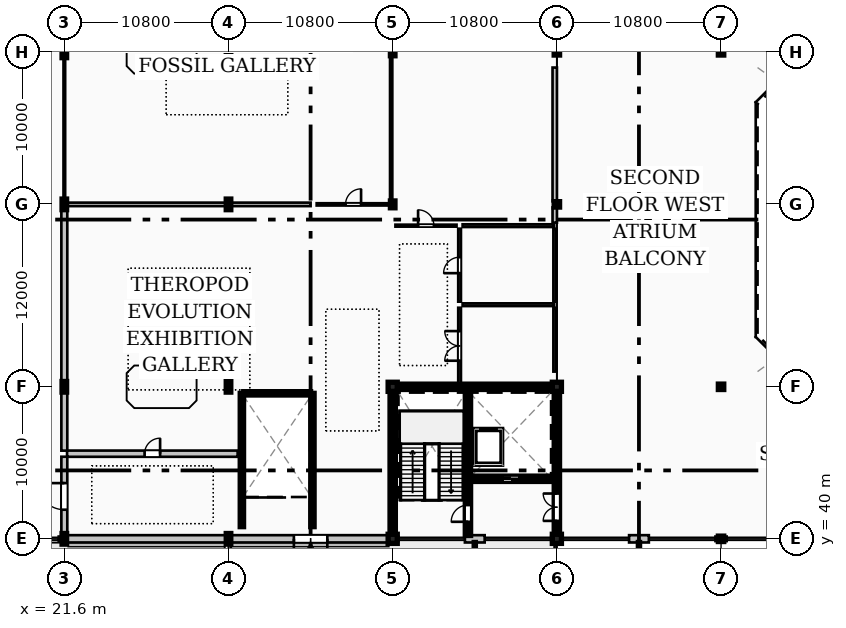
"""IFC4 building model, lengths in metres.
Left out: names, types, materials, properties, quantities, classifications, styles, units other than length and angle.
Written with IfcOpenShell. Run it as: python <this file> out.ifc"""

import sys

from ifc_helpers import new_model, si_unit, direction, frame, frame_2d, origin, origin_2d, place, context, subcontext, project, spatial, rectangle, hollow_circle, i_section, extrude, element, fill, save


model = new_model("IFC4")
c1 = context("Model", 3, precision=1e-05, world=origin(), true_north=direction((0.0, 1.0)))
c2 = subcontext(c1, "Body", "Model", "MODEL_VIEW")
j1 = project(units=[si_unit("LENGTHUNIT", "METRE"), si_unit("PLANEANGLEUNIT", "RADIAN")], contexts=[c1])
p1 = place(None, origin())
s1 = spatial("IfcSite", under=j1, at=p1, CompositionType="ELEMENT")
p2 = place(p1, origin())
s2 = spatial("IfcBuilding", under=s1, at=p2, CompositionType="ELEMENT")
p3 = place(p2, frame((0.0, 0.0, 9.6)))
s3 = spatial("IfcBuildingStorey", under=s2, at=p3, CompositionType="ELEMENT", Elevation=9.6)
for number, where, z_axis, x_axis in (
    (1, (21.6, 40.0, 0.0), (0.0, 0.0, 1.0), (1.0, 0.0, 0.0)),
    (2, (21.6, 50.0, 0.0), (0.0, 0.0, 1.0), (1.0, 0.0, 0.0)),
    (3, (21.6, 62.0, 0.0), (0.0, 0.0, 1.0), (1.0, 0.0, 0.0)),
    (4, (21.6, 72.0, 0.0), (0.0, 0.0, 1.0), (1.0, 0.0, 0.0)),
    (5, (32.4, 40.0, 0.0), (0.0, 0.0, 1.0), (1.0, 0.0, 0.0)),
    (6, (32.4, 50.0, 0.0), (0.0, 0.0, 1.0), (1.0, 0.0, 0.0)),
    (7, (32.4, 62.0, 0.0), (0.0, 0.0, 1.0), (1.0, 0.0, 0.0)),
    (8, (32.4, 72.0, 0.0), (0.0, 0.0, 1.0), (1.0, 0.0, 0.0)),
):
    element("IfcColumn", number, at=place(p3, frame(where, z_axis=z_axis, x_axis=x_axis)), inside=s3, PredefinedType="COLUMN", context=c2, shape_type="SweptSolid", body=[
        extrude(i_section(OverallWidth=0.3, OverallDepth=0.7, WebThickness=0.017, FlangeThickness=0.032, FilletRadius=0.027, at=origin_2d()), origin(), (0.0, 0.0, 1.0), 4.8),
    ])
for number, where, z_axis, x_axis in (
    (9, (43.2, 40.0, 0.0), (0.0, 0.0, 1.0), (1.0, 0.0, 0.0)),
    (10, (43.2, 50.0, 0.0), (0.0, 0.0, 1.0), (1.0, 0.0, 0.0)),
):
    element("IfcColumn", number, at=place(p3, frame(where, z_axis=z_axis, x_axis=x_axis)), inside=s3, PredefinedType="COLUMN", context=c2, shape_type="SweptSolid", body=[
        extrude(rectangle(XDim=0.6, YDim=0.6, at=origin_2d()), origin(), (0.0, 0.0, 1.0), 4.8),
    ])
for number, where, z_axis, x_axis in (
    (11, (43.2, 62.0, 0.0), (0.0, 0.0, 1.0), (1.0, 0.0, 0.0)),
    (12, (43.2, 72.0, 0.0), (0.0, 0.0, 1.0), (1.0, 0.0, 0.0)),
):
    element("IfcColumn", number, at=place(p3, frame(where, z_axis=z_axis, x_axis=x_axis)), inside=s3, PredefinedType="COLUMN", context=c2, shape_type="SweptSolid", body=[
        extrude(i_section(OverallWidth=0.3, OverallDepth=0.45, WebThickness=0.014, FlangeThickness=0.026, FilletRadius=0.027, at=origin_2d()), origin(), (0.0, 0.0, 1.0), 4.8),
    ])
for number, where, z_axis, x_axis in (
    (13, (54.0, 40.0, 0.0), (0.0, 0.0, 1.0), (1.0, 0.0, 0.0)),
    (14, (54.0, 50.0, 0.0), (0.0, 0.0, 1.0), (1.0, 0.0, 0.0)),
):
    element("IfcColumn", number, at=place(p3, frame(where, z_axis=z_axis, x_axis=x_axis)), inside=s3, PredefinedType="COLUMN", context=c2, shape_type="SweptSolid", body=[
        extrude(rectangle(XDim=0.6, YDim=0.6, at=origin_2d()), origin(), (0.0, 0.0, 1.0), 4.8),
    ])
for number, where, z_axis, x_axis in (
    (15, (54.0, 62.0, 0.0), (0.0, 0.0, 1.0), (1.0, 0.0, 0.0)),
    (16, (54.0, 72.0, 0.0), (0.0, 0.0, 1.0), (1.0, 0.0, 0.0)),
    (17, (64.8, 40.0, 0.0), (0.0, 0.0, 1.0), (1.0, 0.0, 0.0)),
    (18, (64.8, 50.0, 0.0), (0.0, 0.0, 1.0), (1.0, 0.0, 0.0)),
    (19, (64.8, 62.0, 0.0), (0.0, 0.0, 1.0), (1.0, 0.0, 0.0)),
    (20, (64.8, 72.0, 0.0), (0.0, 0.0, 1.0), (1.0, 0.0, 0.0)),
):
    element("IfcColumn", number, at=place(p3, frame(where, z_axis=z_axis, x_axis=x_axis)), inside=s3, PredefinedType="COLUMN", context=c2, shape_type="SweptSolid", body=[
        extrude(hollow_circle(Radius=0.178, WallThickness=0.016, at=origin_2d()), origin(), (0.0, 0.0, 1.0), 4.8),
    ])
p4 = place(p3, frame((21.23, 40.0, 0.0), z_axis=(0.0, 0.0, 1.0), x_axis=(1.0, 0.0, 0.0)))
e21 = element("IfcWall", 21, at=p4, inside=s3, PredefinedType="STANDARD", context=c2, shape_type="SweptSolid", body=[
    extrude(rectangle(XDim=0.225, YDim=0.3, at=frame_2d((0.113, 0.0))), origin(), (0.0, 0.0, 1.0), 4.56),
])
p5 = place(p3, frame((21.745, 40.0, 0.0), z_axis=(0.0, 0.0, 1.0), x_axis=(1.0, 0.0, 0.0)))
e22 = element("IfcWall", 22, at=p5, inside=s3, PredefinedType="STANDARD", context=c2, shape_type="SweptSolid", body=[
    extrude(rectangle(XDim=10.51, YDim=0.48, at=frame_2d((5.255, 0.0))), origin(), (0.0, 0.0, 1.0), 3.94),
])
p6 = place(p3, frame((32.545, 40.0, 0.0), z_axis=(0.0, 0.0, 1.0), x_axis=(1.0, 0.0, 0.0)))
e23 = element("IfcWall", 23, at=p6, inside=s3, PredefinedType="STANDARD", context=c2, shape_type="SweptSolid", body=[
    extrude(rectangle(XDim=10.51, YDim=0.48, at=frame_2d((5.255, 0.0))), origin(), (0.0, 0.0, 1.0), 4.09),
])
p7 = place(p6, frame((4.155, 0.0, 0.0)))
e24 = element("IfcOpeningElement", 24, at=p7, cuts=e23, PredefinedType="OPENING", context=c2, shape_type="SweptSolid", body=[
    extrude(rectangle(XDim=2.2, YDim=2.4, at=frame_2d((1.1, 1.2))), frame((0.0, 0.25, 0.0), z_axis=(0.0, -1.0, 0.0), x_axis=(1.0, 0.0, 0.0)), (0.0, 0.0, 1.0), 0.5),
])
p8 = place(p3, frame((47.95, 40.0, 0.0), z_axis=(0.0, 0.0, 1.0), x_axis=(1.0, 0.0, 0.0)))
e25 = element("IfcWall", 25, at=p8, inside=s3, PredefinedType="STANDARD", context=c2, shape_type="SweptSolid", body=[
    extrude(rectangle(XDim=1.3, YDim=0.48, at=frame_2d((0.65, 0.0))), origin(), (0.0, 0.0, 1.0), 4.09),
])
for number, where, z_axis, x_axis in (
    (26, (43.345, 40.0, 0.0), (0.0, 0.0, 1.0), (1.0, 0.0, 0.0)),
    (27, (53.63, 40.0, 0.0), (0.0, 0.0, 1.0), (1.0, 0.0, 0.0)),
):
    element("IfcWall", number, at=place(p3, frame(where, z_axis=z_axis, x_axis=x_axis)), inside=s3, PredefinedType="STANDARD", context=c2, shape_type="SweptSolid", body=[
        extrude(rectangle(XDim=0.225, YDim=0.3, at=frame_2d((0.113, 0.0))), origin(), (0.0, 0.0, 1.0), 4.56),
    ])
p9 = place(p3, frame((58.75, 40.0, 0.0), z_axis=(0.0, 0.0, 1.0), x_axis=(1.0, 0.0, 0.0)))
e28 = element("IfcWall", 28, at=p9, inside=s3, PredefinedType="STANDARD", context=c2, shape_type="SweptSolid", body=[
    extrude(rectangle(XDim=1.3, YDim=0.48, at=frame_2d((0.65, 0.0))), origin(), (0.0, 0.0, 1.0), 4.11),
])
for number, where, z_axis, x_axis in (
    (29, (54.145, 40.0, 0.0), (0.0, 0.0, 1.0), (1.0, 0.0, 0.0)),
    (30, (64.43, 40.0, 0.0), (0.0, 0.0, 1.0), (1.0, 0.0, 0.0)),
):
    element("IfcWall", number, at=place(p3, frame(where, z_axis=z_axis, x_axis=x_axis)), inside=s3, PredefinedType="STANDARD", context=c2, shape_type="SweptSolid", body=[
        extrude(rectangle(XDim=0.225, YDim=0.3, at=frame_2d((0.113, 0.0))), origin(), (0.0, 0.0, 1.0), 4.56),
    ])
p10 = place(p3, frame((64.945, 40.0, 0.0), z_axis=(0.0, 0.0, 1.0), x_axis=(1.0, 0.0, 0.0)))
e31 = element("IfcWall", 31, at=p10, inside=s3, PredefinedType="STANDARD", context=c2, shape_type="SweptSolid", body=[
    extrude(rectangle(XDim=0.225, YDim=0.3, at=frame_2d((0.112, 0.0))), origin(), (0.0, 0.0, 1.0), 4.56),
])
p11 = place(p3, frame((43.5, 50.0, 0.0), z_axis=(0.0, 0.0, 1.0), x_axis=(1.0, 0.0, 0.0)))
e32 = element("IfcWall", 32, at=p11, inside=s3, PredefinedType="SHEAR", context=c2, shape_type="SweptSolid", body=[
    extrude(rectangle(XDim=10.2, YDim=0.35, at=frame_2d((5.1, 0.0))), origin(), (0.0, 0.0, 1.0), 4.56),
])
p12 = place(p3, frame((43.2, 40.3, 0.0), z_axis=(0.0, 0.0, 1.0), x_axis=(0.0, 1.0, 0.0)))
e33 = element("IfcWall", 33, at=p12, inside=s3, PredefinedType="SHEAR", context=c2, shape_type="SweptSolid", body=[
    extrude(rectangle(XDim=9.4, YDim=0.35, at=frame_2d((4.7, 0.0))), origin(), (0.0, 0.0, 1.0), 4.56),
])
p13 = place(p3, frame((54.0, 40.3, 0.0), z_axis=(0.0, 0.0, 1.0), x_axis=(0.0, 1.0, 0.0)))
e34 = element("IfcWall", 34, at=p13, inside=s3, PredefinedType="SHEAR", context=c2, shape_type="SweptSolid", body=[
    extrude(rectangle(XDim=9.4, YDim=0.35, at=frame_2d((4.7, 0.0))), origin(), (0.0, 0.0, 1.0), 4.56),
])
p14 = place(p13, frame((0.88, 0.0, 0.0)))
e35 = element("IfcOpeningElement", 35, at=p14, cuts=e34, PredefinedType="OPENING", context=c2, shape_type="SweptSolid", body=[
    extrude(rectangle(XDim=1.8, YDim=2.25, at=frame_2d((0.9, 1.125))), frame((0.0, 0.185, 0.0), z_axis=(0.0, -1.0, 0.0), x_axis=(1.0, 0.0, 0.0)), (0.0, 0.0, 1.0), 0.37),
])
p15 = place(p3, frame((48.15, 40.22, 0.0), z_axis=(0.0, 0.0, 1.0), x_axis=(0.0, 1.0, 0.0)))
e36 = element("IfcWall", 36, at=p15, inside=s3, PredefinedType="SHEAR", context=c2, shape_type="SweptSolid", body=[
    extrude(rectangle(XDim=9.605, YDim=0.35, at=frame_2d((4.802, 0.0))), origin(), (0.0, 0.0, 1.0), 4.56),
])
p16 = place(p15, frame((0.9, 0.0, 0.0)))
e37 = element("IfcOpeningElement", 37, at=p16, cuts=e36, PredefinedType="OPENING", context=c2, shape_type="SweptSolid", body=[
    extrude(rectangle(XDim=1.1, YDim=2.2, at=frame_2d((0.55, 1.1))), frame((0.0, 0.185, 0.0), z_axis=(0.0, -1.0, 0.0), x_axis=(1.0, 0.0, 0.0)), (0.0, 0.0, 1.0), 0.37),
])
p17 = place(p3, frame((48.33, 43.95, 0.0), z_axis=(0.0, 0.0, 1.0), x_axis=(1.0, 0.0, 0.0)))
e38 = element("IfcWall", 38, at=p17, inside=s3, PredefinedType="SHEAR", context=c2, shape_type="SweptSolid", body=[
    extrude(rectangle(XDim=5.49, YDim=0.35, at=frame_2d((2.745, 0.0))), origin(), (0.0, 0.0, 1.0), 4.56),
])
p18 = place(p17, frame((2.1, 0.0, 0.0)))
e39 = element("IfcOpeningElement", 39, at=p18, cuts=e38, PredefinedType="OPENING", context=c2, shape_type="SweptSolid", body=[
    extrude(rectangle(XDim=1.1, YDim=2.2, at=frame_2d((0.55, 1.1))), frame((0.0, 0.185, 0.0), z_axis=(0.0, -1.0, 0.0), x_axis=(1.0, 0.0, 0.0)), (0.0, 0.0, 1.0), 0.37),
])
for number, where, z_axis, x_axis in (
    (40, (33.28, 40.8, 0.0), (0.0, 0.0, 1.0), (0.0, 1.0, 0.0)),
    (41, (37.92, 40.8, 0.0), (0.0, 0.0, 1.0), (0.0, 1.0, 0.0)),
):
    element("IfcWall", number, at=place(p3, frame(where, z_axis=z_axis, x_axis=x_axis)), inside=s3, PredefinedType="SHEAR", context=c2, shape_type="SweptSolid", body=[
        extrude(rectangle(XDim=8.77, YDim=0.22, at=frame_2d((4.385, 0.0))), origin(), (0.0, 0.0, 1.0), 4.56),
    ])
p19 = place(p3, frame((33.4, 49.57, 0.0), z_axis=(0.0, 0.0, 1.0), x_axis=(1.0, 0.0, 0.0)))
e42 = element("IfcWall", 42, at=p19, inside=s3, PredefinedType="SHEAR", context=c2, shape_type="SweptSolid", body=[
    extrude(rectangle(XDim=4.4, YDim=0.22, at=frame_2d((2.2, 0.0))), origin(), (0.0, 0.0, 1.0), 4.56),
])
p20 = place(p3, frame((21.78, 45.6, 0.0), z_axis=(0.0, 0.0, 1.0), x_axis=(1.0, 0.0, 0.0)))
e43 = element("IfcWall", 43, at=p20, inside=s3, PredefinedType="PARTITIONING", context=c2, shape_type="SweptSolid", body=[
    extrude(rectangle(XDim=11.22, YDim=0.41, at=frame_2d((5.61, 0.0))), origin(), (0.0, 0.0, 1.0), 4.52),
])
p21 = place(p20, frame((5.1, 0.0, 0.0)))
e44 = element("IfcOpeningElement", 44, at=p21, cuts=e43, PredefinedType="OPENING", context=c2, shape_type="SweptSolid", body=[
    extrude(rectangle(XDim=1.02, YDim=2.1, at=frame_2d((0.51, 1.05))), frame((0.0, 0.215, 0.0), z_axis=(0.0, -1.0, 0.0), x_axis=(1.0, 0.0, 0.0)), (0.0, 0.0, 1.0), 0.43),
])
p22 = place(p3, frame((43.38, 60.6, 0.0), z_axis=(0.0, 0.0, 1.0), x_axis=(1.0, 0.0, 0.0)))
e45 = element("IfcWall", 45, at=p22, inside=s3, PredefinedType="PARTITIONING", context=c2, shape_type="SweptSolid", body=[
    extrude(rectangle(XDim=4.02, YDim=0.13, at=frame_2d((2.01, 0.0))), origin(), (0.0, 0.0, 1.0), 4.52),
])
p23 = place(p22, frame((1.49, 0.0, 0.0)))
e46 = element("IfcOpeningElement", 46, at=p23, cuts=e45, PredefinedType="OPENING", context=c2, shape_type="SweptSolid", body=[
    extrude(rectangle(XDim=1.04, YDim=2.2, at=frame_2d((0.52, 1.1))), frame((0.0, 0.075, 0.0), z_axis=(0.0, -1.0, 0.0), x_axis=(1.0, 0.0, 0.0)), (0.0, 0.0, 1.0), 0.15),
])
p24 = place(p3, frame((38.2, 62.0, 0.0), z_axis=(0.0, 0.0, 1.0), x_axis=(1.0, 0.0, 0.0)))
e47 = element("IfcWall", 47, at=p24, inside=s3, PredefinedType="PARTITIONING", context=c2, shape_type="SweptSolid", body=[
    extrude(rectangle(XDim=4.82, YDim=0.15, at=frame_2d((2.41, 0.0))), origin(), (0.0, 0.0, 1.0), 4.099),
])
p25 = place(p24, frame((1.9, 0.0, 0.0)))
e48 = element("IfcOpeningElement", 48, at=p25, cuts=e47, PredefinedType="OPENING", context=c2, shape_type="SweptSolid", body=[
    extrude(rectangle(XDim=1.02, YDim=2.2, at=frame_2d((0.51, 1.1))), frame((0.0, 0.085, 0.0), z_axis=(0.0, -1.0, 0.0), x_axis=(1.0, 0.0, 0.0)), (0.0, 0.0, 1.0), 0.17),
])
p26 = place(p3, frame((21.6, 40.18, 0.0), z_axis=(0.0, 0.0, 1.0), x_axis=(0.0, 1.0, 0.0)))
e49 = element("IfcWall", 49, at=p26, inside=s3, PredefinedType="PARTITIONING", context=c2, shape_type="SweptSolid", body=[
    extrude(rectangle(XDim=5.22, YDim=0.39, at=frame_2d((2.61, 0.0))), origin(), (0.0, 0.0, 1.0), 4.039),
])
p27 = place(p26, frame((1.735, 0.0, 0.0)))
e50 = element("IfcOpeningElement", 50, at=p27, cuts=e49, PredefinedType="OPENING", context=c2, shape_type="SweptSolid", body=[
    extrude(rectangle(XDim=1.75, YDim=2.45, at=frame_2d((0.875, 1.225))), frame((0.0, 0.205, 0.0), z_axis=(0.0, -1.0, 0.0), x_axis=(1.0, 0.0, 0.0)), (0.0, 0.0, 1.0), 0.41),
])
p28 = place(p3, frame((47.6, 50.18, 0.0), z_axis=(0.0, 0.0, 1.0), x_axis=(0.0, 1.0, 0.0)))
e51 = element("IfcWall", 51, at=p28, inside=s3, PredefinedType="PLUMBINGWALL", context=c2, shape_type="SweptSolid", body=[
    extrude(rectangle(XDim=5.02, YDim=0.18, at=frame_2d((2.51, 0.0))), origin(), (0.0, 0.0, 1.0), 4.52),
])
p29 = place(p28, frame((1.535, 0.0, 0.0)))
e52 = element("IfcOpeningElement", 52, at=p29, cuts=e51, PredefinedType="OPENING", context=c2, shape_type="SweptSolid", body=[
    extrude(rectangle(XDim=1.95, YDim=2.5, at=frame_2d((0.975, 1.25))), frame((0.0, 0.1, 0.0), z_axis=(0.0, -1.0, 0.0), x_axis=(1.0, 0.0, 0.0)), (0.0, 0.0, 1.0), 0.2),
])
p30 = place(p3, frame((47.6, 55.6, 0.0), z_axis=(0.0, 0.0, 1.0), x_axis=(0.0, 1.0, 0.0)))
e53 = element("IfcWall", 53, at=p30, inside=s3, PredefinedType="PLUMBINGWALL", context=c2, shape_type="SweptSolid", body=[
    extrude(rectangle(XDim=4.8, YDim=0.18, at=frame_2d((2.4, 0.0))), origin(), (0.0, 0.0, 1.0), 4.52),
])
p31 = place(p30, frame((1.875, 0.0, 0.0)))
e54 = element("IfcOpeningElement", 54, at=p31, cuts=e53, PredefinedType="OPENING", context=c2, shape_type="SweptSolid", body=[
    extrude(rectangle(XDim=1.05, YDim=2.15, at=frame_2d((0.525, 1.075))), frame((0.0, 0.1, 0.0), z_axis=(0.0, -1.0, 0.0), x_axis=(1.0, 0.0, 0.0)), (0.0, 0.0, 1.0), 0.2),
])
for number, where, z_axis, x_axis in (
    (55, (47.8, 55.4, 0.0), (0.0, 0.0, 1.0), (1.0, 0.0, 0.0)),
    (56, (47.8, 60.6, 0.0), (0.0, 0.0, 1.0), (1.0, 0.0, 0.0)),
):
    element("IfcWall", number, at=place(p3, frame(where, z_axis=z_axis, x_axis=x_axis)), inside=s3, PredefinedType="PLUMBINGWALL", context=c2, shape_type="SweptSolid", body=[
        extrude(rectangle(XDim=6.02, YDim=0.18, at=frame_2d((3.01, 0.0))), origin(), (0.0, 0.0, 1.0), 4.52),
    ])
p32 = place(p3, frame((21.78, 62.0, 0.0), z_axis=(0.0, 0.0, 1.0), x_axis=(1.0, 0.0, 0.0)))
e57 = element("IfcWall", 57, at=p32, inside=s3, PredefinedType="PARTITIONING", context=c2, shape_type="SweptSolid", body=[
    extrude(rectangle(XDim=10.42, YDim=0.23, at=frame_2d((5.21, 0.0))), origin(), (0.0, 0.0, 1.0), 3.94),
])
p33 = place(p3, frame((32.6, 62.0, 0.0), z_axis=(0.0, 0.0, 1.0), x_axis=(1.0, 0.0, 0.0)))
e58 = element("IfcWall", 58, at=p33, inside=s3, PredefinedType="PARTITIONING", context=c2, shape_type="SweptSolid", body=[
    extrude(rectangle(XDim=5.2, YDim=0.23, at=frame_2d((2.6, 0.0))), origin(), (0.0, 0.0, 1.0), 4.099),
])
p34 = place(p3, frame((21.6, 45.8, 0.0), z_axis=(0.0, 0.0, 1.0), x_axis=(0.0, 1.0, 0.0)))
e59 = element("IfcWall", 59, at=p34, inside=s3, PredefinedType="PARTITIONING", context=c2, shape_type="SweptSolid", body=[
    extrude(rectangle(XDim=4.0, YDim=0.39, at=frame_2d((2.0, 0.0))), origin(), (0.0, 0.0, 1.0), 4.039),
])
p35 = place(p3, frame((21.6, 50.2, 0.0), z_axis=(0.0, 0.0, 1.0), x_axis=(0.0, 1.0, 0.0)))
e60 = element("IfcWall", 60, at=p35, inside=s3, PredefinedType="PARTITIONING", context=c2, shape_type="SweptSolid", body=[
    extrude(rectangle(XDim=11.62, YDim=0.39, at=frame_2d((5.81, 0.0))), origin(), (0.0, 0.0, 1.0), 3.94),
])
p36 = place(p3, frame((21.6, 62.18, 0.0), z_axis=(0.0, 0.0, 1.0), x_axis=(0.0, 1.0, 0.0)))
e61 = element("IfcWall", 61, at=p36, inside=s3, PredefinedType="PARTITIONING", context=c2, shape_type="SweptSolid", body=[
    extrude(rectangle(XDim=9.62, YDim=0.11, at=frame_2d((4.81, 0.0))), origin(), (0.0, 0.0, 1.0), 4.039),
])
p37 = place(p3, frame((43.1, 62.18, 0.0), z_axis=(0.0, 0.0, 1.0), x_axis=(0.0, 1.0, 0.0)))
e62 = element("IfcWall", 62, at=p37, inside=s3, PredefinedType="PARTITIONING", context=c2, shape_type="SweptSolid", body=[
    extrude(rectangle(XDim=9.62, YDim=0.15, at=frame_2d((4.81, 0.0))), origin(), (0.0, 0.0, 1.0), 4.039),
])
p38 = place(p3, frame((53.86, 51.0, 0.0), z_axis=(0.0, 0.0, 1.0), x_axis=(0.0, 1.0, 0.0)))
e63 = element("IfcWall", 63, at=p38, inside=s3, PredefinedType="PLUMBINGWALL", context=c2, shape_type="SweptSolid", body=[
    extrude(rectangle(XDim=4.2, YDim=0.18, at=frame_2d((2.1, 0.0))), origin(), (0.0, 0.0, 1.0), 4.52),
])
p39 = place(p3, frame((53.86, 55.6, 0.0), z_axis=(0.0, 0.0, 1.0), x_axis=(0.0, 1.0, 0.0)))
e64 = element("IfcWall", 64, at=p39, inside=s3, PredefinedType="PLUMBINGWALL", context=c2, shape_type="SweptSolid", body=[
    extrude(rectangle(XDim=4.8, YDim=0.18, at=frame_2d((2.4, 0.0))), origin(), (0.0, 0.0, 1.0), 4.52),
])
p40 = place(p3, frame((53.86, 60.8, 0.0), z_axis=(0.0, 0.0, 1.0), x_axis=(0.0, 1.0, 0.0)))
e65 = element("IfcWall", 65, at=p40, inside=s3, PredefinedType="PARTITIONING", context=c2, shape_type="SweptSolid", body=[
    extrude(rectangle(XDim=1.0, YDim=0.29, at=frame_2d((0.5, 0.0))), origin(), (0.0, 0.0, 1.0), 4.52),
])
p41 = place(p3, frame((53.86, 62.2, 0.0), z_axis=(0.0, 0.0, 1.0), x_axis=(0.0, 1.0, 0.0)))
e66 = element("IfcWall", 66, at=p41, inside=s3, PredefinedType="PARTITIONING", context=c2, shape_type="SweptSolid", body=[
    extrude(rectangle(XDim=8.8, YDim=0.29, at=frame_2d((4.4, 0.0))), origin(), (0.0, 0.0, 1.0), 4.52),
])
p42 = place(p7, frame((2.2, 0.0, 0.0), z_axis=(0.0, 0.0, 1.0), x_axis=(-1.0, 0.0, 0.0)))
e67 = element("IfcDoor", 67, at=p42, inside=s3, OperationType="DOUBLE_DOOR_SINGLE_SWING", PredefinedType="DOOR", context=c2, shape_type="SweptSolid", body=[
    extrude(rectangle(XDim=2.2, YDim=2.4, at=frame_2d((1.1, 1.2))), frame((0.0, 0.025, 0.0), z_axis=(0.0, -1.0, 0.0), x_axis=(1.0, 0.0, 0.0)), (0.0, 0.0, 1.0), 0.05),
])
fill(e24, e67)
p43 = place(p16, origin())
e68 = element("IfcDoor", 68, at=p43, inside=s3, OperationType="SINGLE_SWING_LEFT", PredefinedType="DOOR", context=c2, shape_type="SweptSolid", body=[
    extrude(rectangle(XDim=1.1, YDim=2.2, at=frame_2d((0.55, 1.1))), frame((0.0, 0.025, 0.0), z_axis=(0.0, -1.0, 0.0), x_axis=(1.0, 0.0, 0.0)), (0.0, 0.0, 1.0), 0.05),
])
fill(e37, e68)
p44 = place(p14, origin())
e69 = element("IfcDoor", 69, at=p44, inside=s3, OperationType="DOUBLE_DOOR_SINGLE_SWING", PredefinedType="DOOR", context=c2, shape_type="SweptSolid", body=[
    extrude(rectangle(XDim=1.8, YDim=2.25, at=frame_2d((0.9, 1.125))), frame((0.0, 0.025, 0.0), z_axis=(0.0, -1.0, 0.0), x_axis=(1.0, 0.0, 0.0)), (0.0, 0.0, 1.0), 0.05),
])
fill(e35, e69)
p45 = place(p18, origin())
e70 = element("IfcDoor", 70, at=p45, inside=s3, OperationType="DOUBLE_DOOR_SLIDING", PredefinedType="DOOR", context=c2, shape_type="SweptSolid", body=[
    extrude(rectangle(XDim=1.1, YDim=2.2, at=frame_2d((0.55, 1.1))), frame((0.0, 0.025, 0.0), z_axis=(0.0, -1.0, 0.0), x_axis=(1.0, 0.0, 0.0)), (0.0, 0.0, 1.0), 0.05),
])
fill(e39, e70)
p46 = place(p21, origin())
e71 = element("IfcDoor", 71, at=p46, inside=s3, OperationType="SINGLE_SWING_RIGHT", PredefinedType="DOOR", context=c2, shape_type="SweptSolid", body=[
    extrude(rectangle(XDim=1.02, YDim=2.1, at=frame_2d((0.51, 1.05))), frame((0.0, 0.025, 0.0), z_axis=(0.0, -1.0, 0.0), x_axis=(1.0, 0.0, 0.0)), (0.0, 0.0, 1.0), 0.05),
])
fill(e44, e71)
p47 = place(p23, origin())
e72 = element("IfcDoor", 72, at=p47, inside=s3, OperationType="SINGLE_SWING_LEFT", PredefinedType="DOOR", context=c2, shape_type="SweptSolid", body=[
    extrude(rectangle(XDim=1.04, YDim=2.2, at=frame_2d((0.52, 1.1))), frame((0.0, 0.025, 0.0), z_axis=(0.0, -1.0, 0.0), x_axis=(1.0, 0.0, 0.0)), (0.0, 0.0, 1.0), 0.05),
])
fill(e46, e72)
p48 = place(p25, origin())
e73 = element("IfcDoor", 73, at=p48, inside=s3, OperationType="SINGLE_SWING_RIGHT", PredefinedType="DOOR", context=c2, shape_type="SweptSolid", body=[
    extrude(rectangle(XDim=1.02, YDim=2.2, at=frame_2d((0.51, 1.1))), frame((0.0, 0.025, 0.0), z_axis=(0.0, -1.0, 0.0), x_axis=(1.0, 0.0, 0.0)), (0.0, 0.0, 1.0), 0.05),
])
fill(e48, e73)
p49 = place(p27, origin())
e74 = element("IfcDoor", 74, at=p49, inside=s3, OperationType="SINGLE_SWING_RIGHT", PredefinedType="DOOR", context=c2, shape_type="SweptSolid", body=[
    extrude(rectangle(XDim=1.75, YDim=2.45, at=frame_2d((0.875, 1.225))), frame((0.0, 0.025, 0.0), z_axis=(0.0, -1.0, 0.0), x_axis=(1.0, 0.0, 0.0)), (0.0, 0.0, 1.0), 0.05),
])
fill(e50, e74)
p50 = place(p29, origin())
e75 = element("IfcDoor", 75, at=p50, inside=s3, OperationType="DOUBLE_DOOR_SINGLE_SWING", PredefinedType="DOOR", context=c2, shape_type="SweptSolid", body=[
    extrude(rectangle(XDim=1.95, YDim=2.5, at=frame_2d((0.975, 1.25))), frame((0.0, 0.025, 0.0), z_axis=(0.0, -1.0, 0.0), x_axis=(1.0, 0.0, 0.0)), (0.0, 0.0, 1.0), 0.05),
])
fill(e52, e75)
p51 = place(p31, origin())
e76 = element("IfcDoor", 76, at=p51, inside=s3, OperationType="SINGLE_SWING_LEFT", PredefinedType="DOOR", context=c2, shape_type="SweptSolid", body=[
    extrude(rectangle(XDim=1.05, YDim=2.15, at=frame_2d((0.525, 1.075))), frame((0.0, 0.025, 0.0), z_axis=(0.0, -1.0, 0.0), x_axis=(1.0, 0.0, 0.0)), (0.0, 0.0, 1.0), 0.05),
])
fill(e54, e76)
save(model, sys.argv[1])
